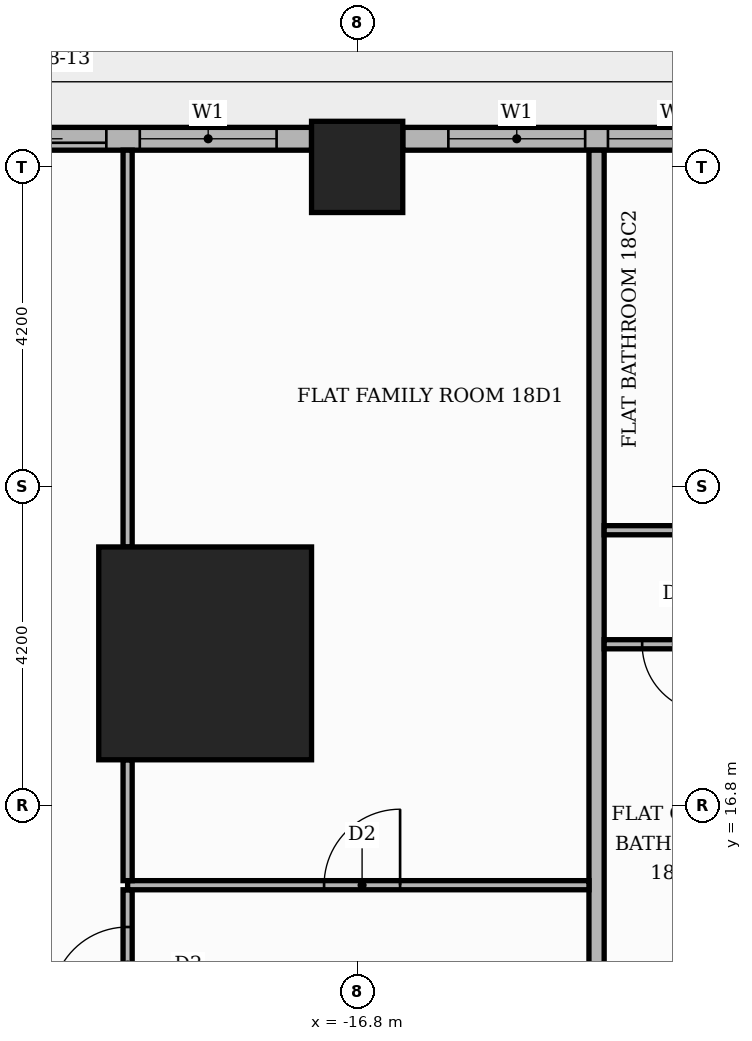
"""IFC4 building model, lengths in metres.
Left out: names, types, materials, properties, quantities, classifications, styles, units other than length and angle.
Written with IfcOpenShell. Run it as: python <this file> out.ifc"""

import sys

from ifc_helpers import new_model, si_unit, direction, frame, frame_2d, origin, origin_2d, place, context, subcontext, project, spatial, rectangle, extrude, element, fill, save


model = new_model("IFC4")
c1 = context("Model", 3, precision=1e-05, world=origin(), true_north=direction((0.0, 1.0)))
c2 = subcontext(c1, "Body", "Model", "MODEL_VIEW")
j1 = project(units=[si_unit("LENGTHUNIT", "METRE"), si_unit("PLANEANGLEUNIT", "RADIAN")], contexts=[c1])
p1 = place(None, origin())
s1 = spatial("IfcSite", under=j1, at=p1, CompositionType="ELEMENT")
p2 = place(p1, origin())
s2 = spatial("IfcBuilding", under=s1, at=p2, CompositionType="ELEMENT")
p3 = place(p2, frame((0.0, 0.0, 79.2)))
s3 = spatial("IfcBuildingStorey", under=s2, at=p3, CompositionType="ELEMENT", Elevation=79.2)
p4 = place(p3, frame((-18.8, 18.8, 0.0), z_axis=(0.0, 0.0, 1.0), x_axis=(1.0, 0.0, 0.0)))
e1 = element("IfcColumn", 1, at=p4, inside=s3, PredefinedType="COLUMN", context=c2, shape_type="SweptSolid", body=[
    extrude(rectangle(XDim=2.8, YDim=2.8, at=origin_2d()), origin(), (0.0, 0.0, 1.0), 3.9),
])
p5 = place(p3, frame((-16.8, 25.2, 0.0), z_axis=(0.0, 0.0, 1.0), x_axis=(1.0, 0.0, 0.0)))
e2 = element("IfcColumn", 2, at=p5, inside=s3, PredefinedType="COLUMN", context=c2, shape_type="SweptSolid", body=[
    extrude(rectangle(XDim=1.2, YDim=1.2, at=origin_2d()), origin(), (0.0, 0.0, 1.0), 3.9),
])
p6 = place(p3, frame((-9.0, 25.57, 0.0), z_axis=(0.0, 0.0, 1.0), x_axis=(-1.0, 0.0, 0.0)))
e3 = element("IfcWall", 3, at=p6, inside=s3, PredefinedType="STANDARD", context=c2, shape_type="SweptSolid", body=[
    extrude(rectangle(XDim=7.2, YDim=0.3, at=frame_2d((3.6, 0.0))), origin(), (0.0, 0.0, 1.0), 3.48),
])
p7 = place(p6, frame((0.6, 0.0, 0.9)))
e4 = element("IfcOpeningElement", 4, at=p7, cuts=e3, PredefinedType="OPENING", context=c2, shape_type="SweptSolid", body=[
    extrude(rectangle(XDim=1.8, YDim=2.1, at=frame_2d((0.9, 1.05))), frame((0.0, 0.16, 0.0), z_axis=(0.0, -1.0, 0.0), x_axis=(1.0, 0.0, 0.0)), (0.0, 0.0, 1.0), 0.32),
])
p8 = place(p6, frame((2.7, 0.0, 0.9)))
e5 = element("IfcOpeningElement", 5, at=p8, cuts=e3, PredefinedType="OPENING", context=c2, shape_type="SweptSolid", body=[
    extrude(rectangle(XDim=1.8, YDim=2.1, at=frame_2d((0.9, 1.05))), frame((0.0, 0.16, 0.0), z_axis=(0.0, -1.0, 0.0), x_axis=(1.0, 0.0, 0.0)), (0.0, 0.0, 1.0), 0.32),
])
p9 = place(p6, frame((4.8, 0.0, 0.9)))
e6 = element("IfcOpeningElement", 6, at=p9, cuts=e3, PredefinedType="OPENING", context=c2, shape_type="SweptSolid", body=[
    extrude(rectangle(XDim=1.8, YDim=2.1, at=frame_2d((0.9, 1.05))), frame((0.0, 0.16, 0.0), z_axis=(0.0, -1.0, 0.0), x_axis=(1.0, 0.0, 0.0)), (0.0, 0.0, 1.0), 0.32),
])
p10 = place(p3, frame((-17.4, 25.57, 0.0), z_axis=(0.0, 0.0, 1.0), x_axis=(-1.0, 0.0, 0.0)))
e7 = element("IfcWall", 7, at=p10, inside=s3, PredefinedType="STANDARD", context=c2, shape_type="SweptSolid", body=[
    extrude(rectangle(XDim=4.82, YDim=0.3, at=frame_2d((2.41, 0.0))), origin(), (0.0, 0.0, 1.0), 3.48),
])
p11 = place(p10, frame((2.7, 0.0, 0.0)))
e8 = element("IfcOpeningElement", 8, at=p11, cuts=e7, PredefinedType="OPENING", context=c2, shape_type="SweptSolid", body=[
    extrude(rectangle(XDim=1.8, YDim=2.4, at=frame_2d((0.9, 1.2))), frame((0.0, 0.16, 0.0), z_axis=(0.0, -1.0, 0.0), x_axis=(1.0, 0.0, 0.0)), (0.0, 0.0, 1.0), 0.32),
])
p12 = place(p10, frame((0.46, 0.0, 0.9)))
e9 = element("IfcOpeningElement", 9, at=p12, cuts=e7, PredefinedType="OPENING", context=c2, shape_type="SweptSolid", body=[
    extrude(rectangle(XDim=1.8, YDim=2.1, at=frame_2d((0.9, 1.05))), frame((0.0, 0.16, 0.0), z_axis=(0.0, -1.0, 0.0), x_axis=(1.0, 0.0, 0.0)), (0.0, 0.0, 1.0), 0.32),
])
p13 = place(p3, frame((-19.82, 13.71, 0.0), z_axis=(0.0, 0.0, 1.0), x_axis=(0.0, 1.0, 0.0)))
e10 = element("IfcWall", 10, at=p13, inside=s3, PredefinedType="PARTITIONING", context=c2, shape_type="SweptSolid", body=[
    extrude(rectangle(XDim=1.98, YDim=0.12, at=frame_2d((0.99, 0.0))), origin(), (0.0, 0.0, 1.0), 3.48),
])
p14 = place(p13, frame((0.49, 0.0, 0.0)))
e11 = element("IfcOpeningElement", 11, at=p14, cuts=e10, PredefinedType="OPENING", context=c2, shape_type="SweptSolid", body=[
    extrude(rectangle(XDim=1.0, YDim=2.1, at=frame_2d((0.5, 1.05))), frame((0.0, 0.07, 0.0), z_axis=(0.0, -1.0, 0.0), x_axis=(1.0, 0.0, 0.0)), (0.0, 0.0, 1.0), 0.14),
])
p15 = place(p3, frame((-13.65, 13.75, 0.0), z_axis=(0.0, 0.0, 1.0), x_axis=(0.0, 1.0, 0.0)))
e12 = element("IfcWall", 12, at=p15, inside=s3, PredefinedType="PARTITIONING", context=c2, shape_type="SweptSolid", body=[
    extrude(rectangle(XDim=11.67, YDim=0.2, at=frame_2d((5.835, 0.0))), origin(), (0.0, 0.0, 1.0), 3.48),
])
p16 = place(p3, frame((-19.82, 15.75, 0.0), z_axis=(0.0, 0.0, 1.0), x_axis=(1.0, 0.0, 0.0)))
e13 = element("IfcWall", 13, at=p16, inside=s3, PredefinedType="PARTITIONING", context=c2, shape_type="SweptSolid", body=[
    extrude(rectangle(XDim=6.07, YDim=0.12, at=frame_2d((3.035, 0.0))), origin(), (0.0, 0.0, 1.0), 3.48),
])
p17 = place(p16, frame((2.585, 0.0, 0.0)))
e14 = element("IfcOpeningElement", 14, at=p17, cuts=e13, PredefinedType="OPENING", context=c2, shape_type="SweptSolid", body=[
    extrude(rectangle(XDim=1.0, YDim=2.1, at=frame_2d((0.5, 1.05))), frame((0.0, 0.07, 0.0), z_axis=(0.0, -1.0, 0.0), x_axis=(1.0, 0.0, 0.0)), (0.0, 0.0, 1.0), 0.14),
])
p18 = place(p3, frame((-19.82, 15.81, 0.0), z_axis=(0.0, 0.0, 1.0), x_axis=(0.0, 1.0, 0.0)))
e15 = element("IfcWall", 15, at=p18, inside=s3, PredefinedType="PARTITIONING", context=c2, shape_type="SweptSolid", body=[
    extrude(rectangle(XDim=1.59, YDim=0.12, at=frame_2d((0.795, 0.0))), origin(), (0.0, 0.0, 1.0), 3.48),
])
p19 = place(p3, frame((-13.55, 18.92, 0.0), z_axis=(0.0, 0.0, 1.0), x_axis=(1.0, 0.0, 0.0)))
e16 = element("IfcWall", 16, at=p19, inside=s3, PredefinedType="PARTITIONING", context=c2, shape_type="SweptSolid", body=[
    extrude(rectangle(XDim=12.5, YDim=0.12, at=frame_2d((6.25, 0.0))), origin(), (0.0, 0.0, 1.0), 3.48),
])
p20 = place(p19, frame((8.9, 0.0, 0.0)))
e17 = element("IfcOpeningElement", 17, at=p20, cuts=e16, PredefinedType="OPENING", context=c2, shape_type="SweptSolid", body=[
    extrude(rectangle(XDim=0.9, YDim=2.1, at=frame_2d((0.45, 1.05))), frame((0.0, 0.07, 0.0), z_axis=(0.0, -1.0, 0.0), x_axis=(1.0, 0.0, 0.0)), (0.0, 0.0, 1.0), 0.14),
])
p21 = place(p19, frame((4.7, 0.0, 0.0)))
e18 = element("IfcOpeningElement", 18, at=p21, cuts=e16, PredefinedType="OPENING", context=c2, shape_type="SweptSolid", body=[
    extrude(rectangle(XDim=0.9, YDim=2.1, at=frame_2d((0.45, 1.05))), frame((0.0, 0.07, 0.0), z_axis=(0.0, -1.0, 0.0), x_axis=(1.0, 0.0, 0.0)), (0.0, 0.0, 1.0), 0.14),
])
p22 = place(p19, frame((2.6, 0.0, 0.0)))
e19 = element("IfcOpeningElement", 19, at=p22, cuts=e16, PredefinedType="OPENING", context=c2, shape_type="SweptSolid", body=[
    extrude(rectangle(XDim=0.9, YDim=2.1, at=frame_2d((0.45, 1.05))), frame((0.0, 0.07, 0.0), z_axis=(0.0, -1.0, 0.0), x_axis=(1.0, 0.0, 0.0)), (0.0, 0.0, 1.0), 0.14),
])
p23 = place(p19, frame((0.5, 0.0, 0.0)))
e20 = element("IfcOpeningElement", 20, at=p23, cuts=e16, PredefinedType="OPENING", context=c2, shape_type="SweptSolid", body=[
    extrude(rectangle(XDim=0.9, YDim=2.1, at=frame_2d((0.45, 1.05))), frame((0.0, 0.07, 0.0), z_axis=(0.0, -1.0, 0.0), x_axis=(1.0, 0.0, 0.0)), (0.0, 0.0, 1.0), 0.14),
])
p24 = place(p3, frame((-19.82, 20.2, 0.0), z_axis=(0.0, 0.0, 1.0), x_axis=(0.0, 1.0, 0.0)))
e21 = element("IfcWall", 21, at=p24, inside=s3, PredefinedType="PARTITIONING", context=c2, shape_type="SweptSolid", body=[
    extrude(rectangle(XDim=5.22, YDim=0.12, at=frame_2d((2.61, 0.0))), origin(), (0.0, 0.0, 1.0), 3.48),
])
p25 = place(p3, frame((-13.55, 20.42, 0.0), z_axis=(0.0, 0.0, 1.0), x_axis=(1.0, 0.0, 0.0)))
e22 = element("IfcWall", 22, at=p25, inside=s3, PredefinedType="PARTITIONING", context=c2, shape_type="SweptSolid", body=[
    extrude(rectangle(XDim=18.7, YDim=0.12, at=frame_2d((9.35, 0.0))), origin(), (0.0, 0.0, 1.0), 3.48),
])
p26 = place(p25, frame((16.2, 0.0, 0.0)))
e23 = element("IfcOpeningElement", 23, at=p26, cuts=e22, PredefinedType="OPENING", context=c2, shape_type="SweptSolid", body=[
    extrude(rectangle(XDim=1.0, YDim=2.1, at=frame_2d((0.5, 1.05))), frame((0.0, 0.07, 0.0), z_axis=(0.0, -1.0, 0.0), x_axis=(1.0, 0.0, 0.0)), (0.0, 0.0, 1.0), 0.14),
])
p27 = place(p25, frame((12.05, 0.0, 0.0)))
e24 = element("IfcOpeningElement", 24, at=p27, cuts=e22, PredefinedType="OPENING", context=c2, shape_type="SweptSolid", body=[
    extrude(rectangle(XDim=0.9, YDim=2.1, at=frame_2d((0.45, 1.05))), frame((0.0, 0.07, 0.0), z_axis=(0.0, -1.0, 0.0), x_axis=(1.0, 0.0, 0.0)), (0.0, 0.0, 1.0), 0.14),
])
p28 = place(p25, frame((5.75, 0.0, 0.0)))
e25 = element("IfcOpeningElement", 25, at=p28, cuts=e22, PredefinedType="OPENING", context=c2, shape_type="SweptSolid", body=[
    extrude(rectangle(XDim=0.9, YDim=2.1, at=frame_2d((0.45, 1.05))), frame((0.0, 0.07, 0.0), z_axis=(0.0, -1.0, 0.0), x_axis=(1.0, 0.0, 0.0)), (0.0, 0.0, 1.0), 0.14),
])
p29 = place(p8, origin())
e26 = element("IfcWindow", 26, at=p29, inside=s3, PartitioningType="SINGLE_PANEL", PredefinedType="WINDOW", context=c2, shape_type="SweptSolid", body=[
    extrude(rectangle(XDim=1.8, YDim=2.1, at=frame_2d((0.9, 1.05))), frame((0.0, 0.03, 0.0), z_axis=(0.0, -1.0, 0.0), x_axis=(1.0, 0.0, 0.0)), (0.0, 0.0, 1.0), 0.06),
])
fill(e5, e26)
p30 = place(p9, origin())
e27 = element("IfcWindow", 27, at=p30, inside=s3, PartitioningType="SINGLE_PANEL", PredefinedType="WINDOW", context=c2, shape_type="SweptSolid", body=[
    extrude(rectangle(XDim=1.8, YDim=2.1, at=frame_2d((0.9, 1.05))), frame((0.0, 0.03, 0.0), z_axis=(0.0, -1.0, 0.0), x_axis=(1.0, 0.0, 0.0)), (0.0, 0.0, 1.0), 0.06),
])
fill(e6, e27)
p31 = place(p11, origin())
e28 = element("IfcDoor", 28, at=p31, inside=s3, OperationType="SLIDING_TO_LEFT", PredefinedType="DOOR", context=c2, shape_type="SweptSolid", body=[
    extrude(rectangle(XDim=1.8, YDim=2.4, at=frame_2d((0.9, 1.2))), frame((0.0, 0.025, 0.0), z_axis=(0.0, -1.0, 0.0), x_axis=(1.0, 0.0, 0.0)), (0.0, 0.0, 1.0), 0.05),
])
fill(e8, e28)
p32 = place(p12, origin())
e29 = element("IfcWindow", 29, at=p32, inside=s3, PartitioningType="SINGLE_PANEL", PredefinedType="WINDOW", context=c2, shape_type="SweptSolid", body=[
    extrude(rectangle(XDim=1.8, YDim=2.1, at=frame_2d((0.9, 1.05))), frame((0.0, 0.03, 0.0), z_axis=(0.0, -1.0, 0.0), x_axis=(1.0, 0.0, 0.0)), (0.0, 0.0, 1.0), 0.06),
])
fill(e9, e29)
p33 = place(p23, frame((0.9, 0.0, 0.0), z_axis=(0.0, 0.0, 1.0), x_axis=(-1.0, 0.0, 0.0)))
e30 = element("IfcDoor", 30, at=p33, inside=s3, OperationType="SINGLE_SWING_RIGHT", PredefinedType="DOOR", context=c2, shape_type="SweptSolid", body=[
    extrude(rectangle(XDim=0.9, YDim=2.1, at=frame_2d((0.45, 1.05))), frame((0.0, 0.025, 0.0), z_axis=(0.0, -1.0, 0.0), x_axis=(1.0, 0.0, 0.0)), (0.0, 0.0, 1.0), 0.05),
])
fill(e20, e30)
p34 = place(p17, origin())
e31 = element("IfcDoor", 31, at=p34, inside=s3, OperationType="SINGLE_SWING_RIGHT", PredefinedType="DOOR", context=c2, shape_type="SweptSolid", body=[
    extrude(rectangle(XDim=1.0, YDim=2.1, at=frame_2d((0.5, 1.05))), frame((0.0, 0.025, 0.0), z_axis=(0.0, -1.0, 0.0), x_axis=(1.0, 0.0, 0.0)), (0.0, 0.0, 1.0), 0.05),
])
fill(e14, e31)
p35 = place(p14, origin())
e32 = element("IfcDoor", 32, at=p35, inside=s3, OperationType="SINGLE_SWING_LEFT", PredefinedType="DOOR", context=c2, shape_type="SweptSolid", body=[
    extrude(rectangle(XDim=1.0, YDim=2.1, at=frame_2d((0.5, 1.05))), frame((0.0, 0.025, 0.0), z_axis=(0.0, -1.0, 0.0), x_axis=(1.0, 0.0, 0.0)), (0.0, 0.0, 1.0), 0.05),
])
fill(e11, e32)
save(model, sys.argv[1])
